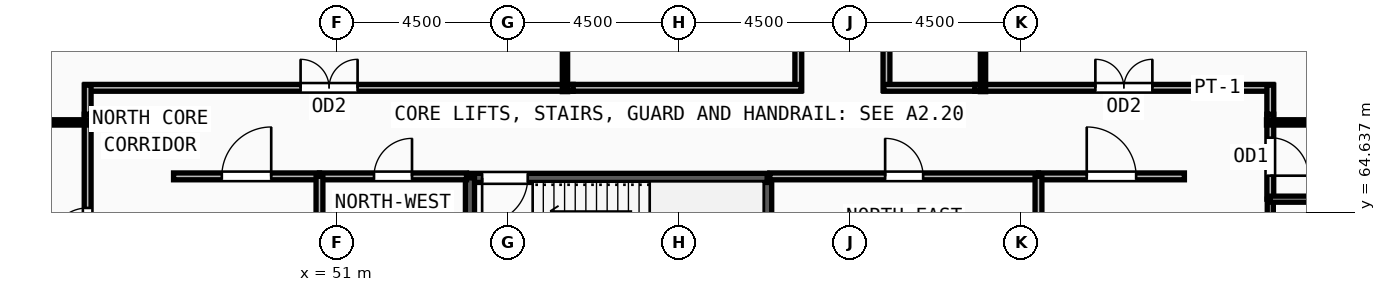
"""IFC4 building model, lengths in metres.
Left out: names, types, materials, properties, quantities, classifications, styles, units other than length and angle.
Written with IfcOpenShell. Run it as: python <this file> out.ifc"""

import sys

from ifc_helpers import new_model, si_unit, direction, frame, frame_2d, origin, place, context, subcontext, project, spatial, rectangle, extrude, source, transform, mapped, element, fill, save


model = new_model("IFC4")
c1 = context("Model", 3, precision=1e-05, world=origin(), true_north=direction((0.0, 1.0)))
c2 = subcontext(c1, "Body", "Model", "MODEL_VIEW")
j1 = project(units=[si_unit("LENGTHUNIT", "METRE"), si_unit("PLANEANGLEUNIT", "RADIAN")], contexts=[c1])
p1 = place(None, origin())
s1 = spatial("IfcSite", under=j1, at=p1, CompositionType="ELEMENT")
p2 = place(p1, origin())
s2 = spatial("IfcBuilding", under=s1, at=p2, CompositionType="ELEMENT")
p3 = place(p2, frame((0.0, 0.0, 201.75)))
s3 = spatial("IfcBuildingStorey", under=s2, at=p3, CompositionType="ELEMENT", Elevation=201.75)
p4 = place(p3, frame((62.32, 62.1, 0.0), z_axis=(0.0, 0.0, 1.0), x_axis=(0.0, 1.0, 0.0)))
e1 = element("IfcWall", 1, at=p4, inside=s3, PredefinedType="SOLIDWALL", context=c2, shape_type="SweptSolid", body=[
    extrude(rectangle(XDim=3.44, YDim=0.24, at=frame_2d((1.72, 0.0))), origin(), (0.0, 0.0, 1.0), 3.57),
])
p5 = place(p3, frame((62.32, 65.54, 0.0), z_axis=(0.0, 0.0, 1.0), x_axis=(-1.0, 0.0, 0.0)))
e2 = element("IfcWall", 2, at=p5, inside=s3, PredefinedType="SOLIDWALL", context=c2, shape_type="SweptSolid", body=[
    extrude(rectangle(XDim=7.82, YDim=0.24, at=frame_2d((3.91, 0.0))), origin(), (0.0, 0.0, 1.0), 3.57),
])
m1 = source(origin(), c2, "Body", "SweptSolid", [
    extrude(rectangle(XDim=1.2, YDim=2.2, at=frame_2d((0.6, 1.1))), frame((0.0, 0.13, 0.0), z_axis=(0.0, -1.0, 0.0), x_axis=(1.0, 0.0, 0.0)), (0.0, 0.0, 1.0), 0.26),
])
p6 = place(p5, frame((6.3, 0.0, 0.0)))
e3 = element("IfcOpeningElement", 3, at=p6, cuts=e2, PredefinedType="OPENING", context=c2, shape_type="MappedRepresentation", body=[
    mapped(m1, transform((0.0, 0.0, 0.0), x_axis=(1.0, 0.0, 0.0), y_axis=(0.0, 1.0, 0.0), z_axis=(0.0, 0.0, 1.0), scale=1.0)),
])
p7 = place(p3, frame((54.5, 65.54, 0.0), z_axis=(0.0, 0.0, 1.0), x_axis=(0.0, -1.0, 0.0)))
e4 = element("IfcWall", 4, at=p7, inside=s3, PredefinedType="SOLIDWALL", context=c2, shape_type="SweptSolid", body=[
    extrude(rectangle(XDim=3.44, YDim=0.24, at=frame_2d((1.72, 0.0))), origin(), (0.0, 0.0, 1.0), 3.57),
])
p8 = place(p3, frame((75.56, 62.24, 0.0), z_axis=(0.0, 0.0, 1.0), x_axis=(0.0, 1.0, 0.0)))
e5 = element("IfcWall", 5, at=p8, inside=s3, PredefinedType="PARTITIONING", context=c2, shape_type="SweptSolid", body=[
    extrude(rectangle(XDim=2.74, YDim=0.16, at=frame_2d((1.37, 0.0))), origin(), (0.0, 0.0, 1.0), 3.57),
])
m2 = source(origin(), c2, "Body", "SweptSolid", [
    extrude(rectangle(XDim=1.05, YDim=2.15, at=frame_2d((0.525, 1.075))), frame((0.0, 0.09, 0.0), z_axis=(0.0, -1.0, 0.0), x_axis=(1.0, 0.0, 0.0)), (0.0, 0.0, 1.0), 0.18),
])
p9 = place(p8, frame((0.845, 0.0, 0.0)))
e6 = element("IfcOpeningElement", 6, at=p9, cuts=e5, PredefinedType="OPENING", context=c2, shape_type="MappedRepresentation", body=[
    mapped(m2, transform((0.0, 0.0, 0.0), x_axis=(1.0, 0.0, 0.0), y_axis=(0.0, 1.0, 0.0), z_axis=(0.0, 0.0, 1.0), scale=1.0)),
])
p10 = place(p3, frame((50.54, 65.58, 0.0), z_axis=(0.0, 0.0, 1.0), x_axis=(1.0, 0.0, 0.0)))
e7 = element("IfcWall", 7, at=p10, inside=s3, PredefinedType="PARTITIONING", context=c2, shape_type="SweptSolid", body=[
    extrude(rectangle(XDim=3.87, YDim=0.18, at=frame_2d((1.935, 0.0))), origin(), (0.0, 0.0, 1.0), 3.57),
])
m3 = source(origin(), c2, "Body", "SweptSolid", [
    extrude(rectangle(XDim=1.0, YDim=2.2, at=frame_2d((0.5, 1.1))), frame((0.0, 0.1, 0.0), z_axis=(0.0, -1.0, 0.0), x_axis=(1.0, 0.0, 0.0)), (0.0, 0.0, 1.0), 0.2),
])
p11 = place(p10, frame((1.435, 0.0, 0.0)))
e8 = element("IfcOpeningElement", 8, at=p11, cuts=e7, PredefinedType="OPENING", context=c2, shape_type="MappedRepresentation", body=[
    mapped(m3, transform((0.0, 0.0, 0.0), x_axis=(1.0, 0.0, 0.0), y_axis=(0.0, 1.0, 0.0), z_axis=(0.0, 0.0, 1.0), scale=1.0)),
])
p12 = place(p3, frame((62.39, 65.58, 0.0), z_axis=(0.0, 0.0, 1.0), x_axis=(1.0, 0.0, 0.0)))
e9 = element("IfcWall", 9, at=p12, inside=s3, PredefinedType="PARTITIONING", context=c2, shape_type="SweptSolid", body=[
    extrude(rectangle(XDim=7.07, YDim=0.18, at=frame_2d((3.535, 0.0))), origin(), (0.0, 0.0, 1.0), 3.57),
])
p13 = place(p12, frame((3.035, 0.0, 0.0)))
e10 = element("IfcOpeningElement", 10, at=p13, cuts=e9, PredefinedType="OPENING", context=c2, shape_type="MappedRepresentation", body=[
    mapped(m3, transform((0.0, 0.0, 0.0), x_axis=(1.0, 0.0, 0.0), y_axis=(0.0, 1.0, 0.0), z_axis=(0.0, 0.0, 1.0), scale=1.0)),
])
p14 = place(p3, frame((46.7, 65.58, 0.0), z_axis=(0.0, 0.0, 1.0), x_axis=(1.0, 0.0, 0.0)))
e11 = element("IfcWall", 11, at=p14, inside=s3, PredefinedType="PARTITIONING", context=c2, shape_type="SweptSolid", body=[
    extrude(rectangle(XDim=3.84, YDim=0.18, at=frame_2d((1.92, 0.0))), origin(), (0.0, 0.0, 1.0), 3.57),
])
m4 = source(origin(), c2, "Body", "SweptSolid", [
    extrude(rectangle(XDim=1.3, YDim=2.2, at=frame_2d((0.65, 1.1))), frame((0.0, 0.1, 0.0), z_axis=(0.0, -1.0, 0.0), x_axis=(1.0, 0.0, 0.0)), (0.0, 0.0, 1.0), 0.2),
])
p15 = place(p14, frame((1.27, 0.0, 0.0)))
e12 = element("IfcOpeningElement", 12, at=p15, cuts=e11, PredefinedType="OPENING", context=c2, shape_type="MappedRepresentation", body=[
    mapped(m4, transform((0.0, 0.0, 0.0), x_axis=(1.0, 0.0, 0.0), y_axis=(0.0, 1.0, 0.0), z_axis=(0.0, 0.0, 1.0), scale=1.0)),
])
p16 = place(p3, frame((69.46, 65.58, 0.0), z_axis=(0.0, 0.0, 1.0), x_axis=(1.0, 0.0, 0.0)))
e13 = element("IfcWall", 13, at=p16, inside=s3, PredefinedType="PARTITIONING", context=c2, shape_type="SweptSolid", body=[
    extrude(rectangle(XDim=3.84, YDim=0.18, at=frame_2d((1.92, 0.0))), origin(), (0.0, 0.0, 1.0), 3.57),
])
p17 = place(p16, frame((1.27, 0.0, 0.0)))
e14 = element("IfcOpeningElement", 14, at=p17, cuts=e13, PredefinedType="OPENING", context=c2, shape_type="MappedRepresentation", body=[
    mapped(m4, transform((0.0, 0.0, 0.0), x_axis=(1.0, 0.0, 0.0), y_axis=(0.0, 1.0, 0.0), z_axis=(0.0, 0.0, 1.0), scale=1.0)),
])
p18 = place(p3, frame((75.56, 67.215, 0.0), z_axis=(0.0, 0.0, 1.0), x_axis=(0.0, -1.0, 0.0)))
e15 = element("IfcWall", 15, at=p18, inside=s3, PredefinedType="PARTITIONING", context=c2, shape_type="SweptSolid", body=[
    extrude(rectangle(XDim=2.235, YDim=0.18, at=frame_2d((1.118, 0.0))), origin(), (0.0, 0.0, 1.0), 3.57),
])
p19 = place(p18, frame((0.617, 0.0, 0.0)))
e16 = element("IfcOpeningElement", 16, at=p19, cuts=e15, PredefinedType="OPENING", context=c2, shape_type="MappedRepresentation", body=[
    mapped(m3, transform((0.0, 0.0, 0.0), x_axis=(1.0, 0.0, 0.0), y_axis=(0.0, 1.0, 0.0), z_axis=(0.0, 0.0, 1.0), scale=1.0)),
])
p20 = place(p3, frame((67.785, 67.91, 0.0), z_axis=(0.0, 0.0, 1.0), x_axis=(1.0, 0.0, 0.0)))
e17 = element("IfcWall", 17, at=p20, inside=s3, PredefinedType="PARTITIONING", context=c2, shape_type="SweptSolid", body=[
    extrude(rectangle(XDim=7.845, YDim=0.18, at=frame_2d((3.922, 0.0))), origin(), (0.0, 0.0, 1.0), 3.57),
])
m5 = source(origin(), c2, "Body", "SweptSolid", [
    extrude(rectangle(XDim=1.5, YDim=2.2, at=frame_2d((0.75, 1.1))), frame((0.0, 0.1, 0.0), z_axis=(0.0, -1.0, 0.0), x_axis=(1.0, 0.0, 0.0)), (0.0, 0.0, 1.0), 0.2),
])
p21 = place(p20, frame((3.172, 0.0, 0.0)))
e18 = element("IfcOpeningElement", 18, at=p21, cuts=e17, PredefinedType="OPENING", context=c2, shape_type="MappedRepresentation", body=[
    mapped(m5, transform((0.0, 0.0, 0.0), x_axis=(1.0, 0.0, 0.0), y_axis=(0.0, 1.0, 0.0), z_axis=(0.0, 0.0, 1.0), scale=1.0)),
])
p22 = place(p3, frame((65.46, 78.892, 0.0), z_axis=(0.0, 0.0, 1.0), x_axis=(0.0, -1.0, 0.0)))
e19 = element("IfcWall", 19, at=p22, inside=s3, PredefinedType="PARTITIONING", context=c2, shape_type="SweptSolid", body=[
    extrude(rectangle(XDim=11.052, YDim=0.18, at=frame_2d((5.526, 0.0))), origin(), (0.0, 0.0, 1.0), 3.57),
])
p23 = place(p22, frame((5.026, 0.0, 0.0)))
e20 = element("IfcOpeningElement", 20, at=p23, cuts=e19, PredefinedType="OPENING", context=c2, shape_type="MappedRepresentation", body=[
    mapped(m3, transform((0.0, 0.0, 0.0), x_axis=(1.0, 0.0, 0.0), y_axis=(0.0, 1.0, 0.0), z_axis=(0.0, 0.0, 1.0), scale=1.0)),
])
p24 = place(p3, frame((63.14, 67.84, 0.0), z_axis=(0.0, 0.0, 1.0), x_axis=(0.0, 1.0, 0.0)))
e21 = element("IfcWall", 21, at=p24, inside=s3, PredefinedType="PARTITIONING", context=c2, shape_type="SweptSolid", body=[
    extrude(rectangle(XDim=11.223, YDim=0.18, at=frame_2d((5.611, 0.0))), origin(), (0.0, 0.0, 1.0), 3.57),
])
p25 = place(p24, frame((5.111, 0.0, 0.0)))
e22 = element("IfcOpeningElement", 22, at=p25, cuts=e21, PredefinedType="OPENING", context=c2, shape_type="MappedRepresentation", body=[
    mapped(m3, transform((0.0, 0.0, 0.0), x_axis=(1.0, 0.0, 0.0), y_axis=(0.0, 1.0, 0.0), z_axis=(0.0, 0.0, 1.0), scale=1.0)),
])
p26 = place(p3, frame((44.37, 67.91, 0.0), z_axis=(0.0, 0.0, 1.0), x_axis=(1.0, 0.0, 0.0)))
e23 = element("IfcWall", 23, at=p26, inside=s3, PredefinedType="PARTITIONING", context=c2, shape_type="SweptSolid", body=[
    extrude(rectangle(XDim=12.845, YDim=0.18, at=frame_2d((6.422, 0.0))), origin(), (0.0, 0.0, 1.0), 3.57),
])
p27 = place(p26, frame((5.673, 0.0, 0.0)))
e24 = element("IfcOpeningElement", 24, at=p27, cuts=e23, PredefinedType="OPENING", context=c2, shape_type="MappedRepresentation", body=[
    mapped(m5, transform((0.0, 0.0, 0.0), x_axis=(1.0, 0.0, 0.0), y_axis=(0.0, 1.0, 0.0), z_axis=(0.0, 0.0, 1.0), scale=1.0)),
])
p28 = place(p3, frame((44.44, 61.285, 0.0), z_axis=(0.0, 0.0, 1.0), x_axis=(0.0, 1.0, 0.0)))
e25 = element("IfcWall", 25, at=p28, inside=s3, PredefinedType="PARTITIONING", context=c2, shape_type="SweptSolid", body=[
    extrude(rectangle(XDim=5.93, YDim=0.18, at=frame_2d((2.965, 0.0))), origin(), (0.0, 0.0, 1.0), 3.57),
])
p29 = place(p28, frame((2.465, 0.0, 0.0)))
e26 = element("IfcOpeningElement", 26, at=p29, cuts=e25, PredefinedType="OPENING", context=c2, shape_type="MappedRepresentation", body=[
    mapped(m3, transform((0.0, 0.0, 0.0), x_axis=(1.0, 0.0, 0.0), y_axis=(0.0, 1.0, 0.0), z_axis=(0.0, 0.0, 1.0), scale=1.0)),
])
p30 = place(p3, frame((75.56, 64.98, 0.0), z_axis=(0.0, 0.0, 1.0), x_axis=(1.0, 0.0, 0.0)))
e27 = element("IfcWall", 27, at=p30, inside=s3, PredefinedType="PARTITIONING", context=c2, shape_type="SweptSolid", body=[
    extrude(rectangle(XDim=4.46, YDim=0.16, at=frame_2d((2.23, 0.0))), origin(), (0.0, 0.0, 1.0), 3.57),
])
for number, where, z_axis, x_axis in (
    (28, (50.54, 61.95, 0.0), (0.0, 0.0, 1.0), (0.0, 1.0, 0.0)),
    (29, (69.46, 61.95, 0.0), (0.0, 0.0, 1.0), (0.0, 1.0, 0.0)),
):
    element("IfcWall", number, at=place(p3, frame(where, z_axis=z_axis, x_axis=x_axis)), inside=s3, PredefinedType="PARTITIONING", context=c2, shape_type="SweptSolid", body=[
        extrude(rectangle(XDim=3.63, YDim=0.18, at=frame_2d((1.815, 0.0))), origin(), (0.0, 0.0, 1.0), 3.57),
    ])
p31 = place(p3, frame((75.56, 67.98, 0.0), z_axis=(0.0, 0.0, 1.0), x_axis=(0.0, -1.0, 0.0)))
e30 = element("IfcWall", 30, at=p31, inside=s3, PredefinedType="PARTITIONING", context=c2, shape_type="SweptSolid", body=[
    extrude(rectangle(XDim=0.765, YDim=0.18, at=frame_2d((0.382, 0.0))), origin(), (0.0, 0.0, 1.0), 3.57),
])
p32 = place(p3, frame((65.39, 67.91, 0.0), z_axis=(0.0, 0.0, 1.0), x_axis=(1.0, 0.0, 0.0)))
e31 = element("IfcWall", 31, at=p32, inside=s3, PredefinedType="PARTITIONING", context=c2, shape_type="SweptSolid", body=[
    extrude(rectangle(XDim=2.395, YDim=0.18, at=frame_2d((1.198, 0.0))), origin(), (0.0, 0.0, 1.0), 3.57),
])
p33 = place(p3, frame((57.215, 67.91, 0.0), z_axis=(0.0, 0.0, 1.0), x_axis=(1.0, 0.0, 0.0)))
e32 = element("IfcWall", 32, at=p33, inside=s3, PredefinedType="PARTITIONING", context=c2, shape_type="SweptSolid", body=[
    extrude(rectangle(XDim=5.995, YDim=0.18, at=frame_2d((2.998, 0.0))), origin(), (0.0, 0.0, 1.0), 3.57),
])
p34 = place(p3, frame((44.44, 67.215, 0.0), z_axis=(0.0, 0.0, 1.0), x_axis=(0.0, 1.0, 0.0)))
e33 = element("IfcWall", 33, at=p34, inside=s3, PredefinedType="PARTITIONING", context=c2, shape_type="SweptSolid", body=[
    extrude(rectangle(XDim=0.765, YDim=0.18, at=frame_2d((0.382, 0.0))), origin(), (0.0, 0.0, 1.0), 3.57),
])
p35 = place(p3, frame((44.54, 67.0, 0.0), z_axis=(0.0, 0.0, 1.0), x_axis=(-1.0, 0.0, 0.0)))
e34 = element("IfcWall", 34, at=p35, inside=s3, PredefinedType="PARTITIONING", context=c2, shape_type="SweptSolid", body=[
    extrude(rectangle(XDim=18.931, YDim=0.14, at=frame_2d((9.466, 0.0))), origin(), (0.0, 0.0, 1.0), 2.855),
])
p36 = place(p3, frame((75.46, 67.0, 0.0), z_axis=(0.0, 0.0, 1.0), x_axis=(1.0, 0.0, 0.0)))
e35 = element("IfcWall", 35, at=p36, inside=s3, PredefinedType="PARTITIONING", context=c2, shape_type="SweptSolid", body=[
    extrude(rectangle(XDim=18.925, YDim=0.14, at=frame_2d((9.462, 0.0))), origin(), (0.0, 0.0, 1.0), 2.855),
])
p37 = place(p3, frame((57.0, 67.81, 0.0), z_axis=(0.0, 0.0, 1.0), x_axis=(0.0, 1.0, 0.0)))
e36 = element("IfcWall", 36, at=p37, inside=s3, PredefinedType="PARTITIONING", context=c2, shape_type="SweptSolid", body=[
    extrude(rectangle(XDim=11.038, YDim=0.14, at=frame_2d((5.519, 0.0))), origin(), (0.0, 0.0, 1.0), 3.57),
])
p38 = place(p3, frame((68.0, 67.81, 0.0), z_axis=(0.0, 0.0, 1.0), x_axis=(0.0, 1.0, 0.0)))
e37 = element("IfcWall", 37, at=p38, inside=s3, PredefinedType="PARTITIONING", context=c2, shape_type="SweptSolid", body=[
    extrude(rectangle(XDim=10.984, YDim=0.14, at=frame_2d((5.492, 0.0))), origin(), (0.0, 0.0, 1.0), 3.57),
])
m6 = source(origin(), c2, "Body", "SweptSolid", [
    extrude(rectangle(XDim=1.2, YDim=2.2, at=frame_2d((0.6, 1.1))), frame((0.0, 0.025, 0.0), z_axis=(0.0, -1.0, 0.0), x_axis=(1.0, 0.0, 0.0)), (0.0, 0.0, 1.0), 0.05),
])
p39 = place(p6, origin())
e38 = element("IfcDoor", 38, at=p39, inside=s3, OperationType="SINGLE_SWING_RIGHT", PredefinedType="DOOR", context=c2, shape_type="MappedRepresentation", body=[
    mapped(m6, transform((0.0, 0.0, 0.0), x_axis=(1.0, 0.0, 0.0), y_axis=(0.0, 1.0, 0.0), z_axis=(0.0, 0.0, 1.0), scale=1.0)),
])
fill(e3, e38)
m7 = source(origin(), c2, "Body", "SweptSolid", [
    extrude(rectangle(XDim=1.0, YDim=2.2, at=frame_2d((0.5, 1.1))), frame((0.0, 0.025, 0.0), z_axis=(0.0, -1.0, 0.0), x_axis=(1.0, 0.0, 0.0)), (0.0, 0.0, 1.0), 0.05),
])
p40 = place(p11, origin())
e39 = element("IfcDoor", 39, at=p40, inside=s3, OperationType="SINGLE_SWING_RIGHT", PredefinedType="DOOR", context=c2, shape_type="MappedRepresentation", body=[
    mapped(m7, transform((0.0, 0.0, 0.0), x_axis=(1.0, 0.0, 0.0), y_axis=(0.0, 1.0, 0.0), z_axis=(0.0, 0.0, 1.0), scale=1.0)),
])
fill(e8, e39)
p41 = place(p13, origin())
e40 = element("IfcDoor", 40, at=p41, inside=s3, OperationType="SINGLE_SWING_LEFT", PredefinedType="DOOR", context=c2, shape_type="MappedRepresentation", body=[
    mapped(m7, transform((0.0, 0.0, 0.0), x_axis=(1.0, 0.0, 0.0), y_axis=(0.0, 1.0, 0.0), z_axis=(0.0, 0.0, 1.0), scale=1.0)),
])
fill(e10, e40)
m8 = source(origin(), c2, "Body", "SweptSolid", [
    extrude(rectangle(XDim=1.3, YDim=2.2, at=frame_2d((0.65, 1.1))), frame((0.0, 0.025, 0.0), z_axis=(0.0, -1.0, 0.0), x_axis=(1.0, 0.0, 0.0)), (0.0, 0.0, 1.0), 0.05),
])
p42 = place(p15, origin())
e41 = element("IfcDoor", 41, at=p42, inside=s3, OperationType="SINGLE_SWING_RIGHT", PredefinedType="DOOR", context=c2, shape_type="MappedRepresentation", body=[
    mapped(m8, transform((0.0, 0.0, 0.0), x_axis=(1.0, 0.0, 0.0), y_axis=(0.0, 1.0, 0.0), z_axis=(0.0, 0.0, 1.0), scale=1.0)),
])
fill(e12, e41)
p43 = place(p17, origin())
e42 = element("IfcDoor", 42, at=p43, inside=s3, OperationType="SINGLE_SWING_LEFT", PredefinedType="DOOR", context=c2, shape_type="MappedRepresentation", body=[
    mapped(m8, transform((0.0, 0.0, 0.0), x_axis=(1.0, 0.0, 0.0), y_axis=(0.0, 1.0, 0.0), z_axis=(0.0, 0.0, 1.0), scale=1.0)),
])
fill(e14, e42)
p44 = place(p19, origin())
e43 = element("IfcDoor", 43, at=p44, inside=s3, OperationType="SINGLE_SWING_RIGHT", PredefinedType="DOOR", context=c2, shape_type="MappedRepresentation", body=[
    mapped(m7, transform((0.0, 0.0, 0.0), x_axis=(1.0, 0.0, 0.0), y_axis=(0.0, 1.0, 0.0), z_axis=(0.0, 0.0, 1.0), scale=1.0)),
])
fill(e16, e43)
m9 = source(origin(), c2, "Body", "SweptSolid", [
    extrude(rectangle(XDim=1.5, YDim=2.2, at=frame_2d((0.75, 1.1))), frame((0.0, 0.025, 0.0), z_axis=(0.0, -1.0, 0.0), x_axis=(1.0, 0.0, 0.0)), (0.0, 0.0, 1.0), 0.05),
])
p45 = place(p21, origin())
e44 = element("IfcDoor", 44, at=p45, inside=s3, OperationType="DOUBLE_DOOR_SINGLE_SWING", PredefinedType="DOOR", context=c2, shape_type="MappedRepresentation", body=[
    mapped(m9, transform((0.0, 0.0, 0.0), x_axis=(1.0, 0.0, 0.0), y_axis=(0.0, 1.0, 0.0), z_axis=(0.0, 0.0, 1.0), scale=1.0)),
])
fill(e18, e44)
p46 = place(p27, origin())
e45 = element("IfcDoor", 45, at=p46, inside=s3, OperationType="DOUBLE_DOOR_SINGLE_SWING", PredefinedType="DOOR", context=c2, shape_type="MappedRepresentation", body=[
    mapped(m9, transform((0.0, 0.0, 0.0), x_axis=(1.0, 0.0, 0.0), y_axis=(0.0, 1.0, 0.0), z_axis=(0.0, 0.0, 1.0), scale=1.0)),
])
fill(e24, e45)
p47 = place(p29, origin())
e46 = element("IfcDoor", 46, at=p47, inside=s3, OperationType="SINGLE_SWING_LEFT", PredefinedType="DOOR", context=c2, shape_type="MappedRepresentation", body=[
    mapped(m7, transform((0.0, 0.0, 0.0), x_axis=(1.0, 0.0, 0.0), y_axis=(0.0, 1.0, 0.0), z_axis=(0.0, 0.0, 1.0), scale=1.0)),
])
fill(e26, e46)
save(model, sys.argv[1])
